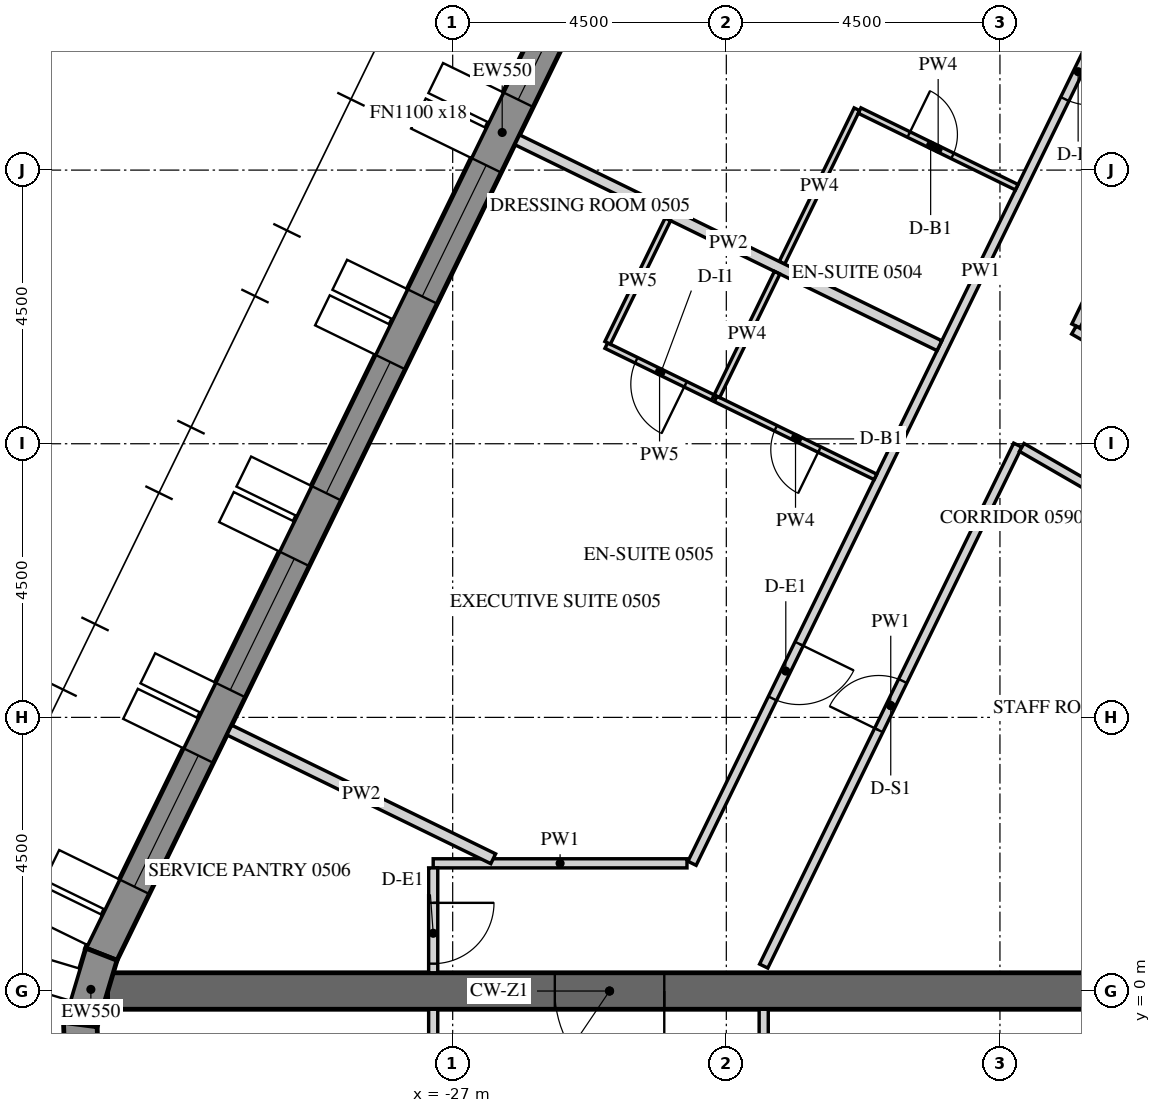
"""IFC4 building model, lengths in metres.
Left out: names, types, materials, properties, quantities, classifications, styles, units other than length and angle.
Written with IfcOpenShell. Run it as: python <this file> out.ifc"""

import sys

from ifc_helpers import new_model, si_unit, direction, frame, frame_2d, origin, place, context, subcontext, project, spatial, polyline, rectangle, outline, extrude, element, fill, save


model = new_model("IFC4")
c1 = context("Model", 3, precision=1e-05, world=origin(), true_north=direction((0.0, 1.0)))
c2 = subcontext(c1, "Body", "Model", "MODEL_VIEW")
j1 = project(units=[si_unit("LENGTHUNIT", "METRE"), si_unit("PLANEANGLEUNIT", "RADIAN")], contexts=[c1])
p1 = place(None, origin())
s1 = spatial("IfcSite", under=j1, at=p1, CompositionType="ELEMENT")
p2 = place(p1, origin())
s2 = spatial("IfcBuilding", under=s1, at=p2, CompositionType="ELEMENT")
p3 = place(p2, frame((0.0, 0.0, 80.4)))
s3 = spatial("IfcBuildingStorey", under=s2, at=p3, CompositionType="ELEMENT", Elevation=80.4)
p4 = place(p3, frame((-19.595, 27.633, -0.15), z_axis=(0.0, 0.0, 1.0), x_axis=(-0.438368285794, -0.898795441694, 0.0)))
e1 = element("IfcWall", 1, at=p4, inside=s3, PredefinedType="SOLIDWALL", context=c2, shape_type="SweptSolid", body=[
    extrude(outline(polyline([(-0.026, -0.275), (30.093, -0.275), (30.048, 0.275), (0.026, 0.275), (-0.026, -0.275)])), origin(), (0.0, 0.0, 1.0), 3.9),
])
p5 = place(p4, frame((1.236, 0.0, 1.05)))
e2 = element("IfcOpeningElement", 2, at=p5, cuts=e1, PredefinedType="OPENING", context=c2, shape_type="SweptSolid", body=[
    extrude(rectangle(XDim=2.4, YDim=2.4, at=frame_2d((1.2, 1.2))), frame((0.0, 0.285, 0.0), z_axis=(0.0, -1.0, 0.0), x_axis=(1.0, 0.0, 0.0)), (0.0, 0.0, 1.0), 0.57),
])
p6 = place(p4, frame((4.835, 0.0, 1.05)))
e3 = element("IfcOpeningElement", 3, at=p6, cuts=e1, PredefinedType="OPENING", context=c2, shape_type="SweptSolid", body=[
    extrude(rectangle(XDim=2.4, YDim=2.4, at=frame_2d((1.2, 1.2))), frame((0.0, 0.285, 0.0), z_axis=(0.0, -1.0, 0.0), x_axis=(1.0, 0.0, 0.0)), (0.0, 0.0, 1.0), 0.57),
])
p7 = place(p4, frame((8.436, 0.0, 1.05)))
e4 = element("IfcOpeningElement", 4, at=p7, cuts=e1, PredefinedType="OPENING", context=c2, shape_type="SweptSolid", body=[
    extrude(rectangle(XDim=2.4, YDim=2.4, at=frame_2d((1.2, 1.2))), frame((0.0, 0.285, 0.0), z_axis=(0.0, -1.0, 0.0), x_axis=(1.0, 0.0, 0.0)), (0.0, 0.0, 1.0), 0.57),
])
p8 = place(p4, frame((12.035, 0.0, 1.05)))
e5 = element("IfcOpeningElement", 5, at=p8, cuts=e1, PredefinedType="OPENING", context=c2, shape_type="SweptSolid", body=[
    extrude(rectangle(XDim=2.4, YDim=2.4, at=frame_2d((1.2, 1.2))), frame((0.0, 0.285, 0.0), z_axis=(0.0, -1.0, 0.0), x_axis=(1.0, 0.0, 0.0)), (0.0, 0.0, 1.0), 0.57),
])
p9 = place(p4, frame((15.635, 0.0, 1.05)))
e6 = element("IfcOpeningElement", 6, at=p9, cuts=e1, PredefinedType="OPENING", context=c2, shape_type="SweptSolid", body=[
    extrude(rectangle(XDim=2.4, YDim=2.4, at=frame_2d((1.2, 1.2))), frame((0.0, 0.285, 0.0), z_axis=(0.0, -1.0, 0.0), x_axis=(1.0, 0.0, 0.0)), (0.0, 0.0, 1.0), 0.57),
])
p10 = place(p4, frame((19.236, 0.0, 1.05)))
e7 = element("IfcOpeningElement", 7, at=p10, cuts=e1, PredefinedType="OPENING", context=c2, shape_type="SweptSolid", body=[
    extrude(rectangle(XDim=2.4, YDim=2.4, at=frame_2d((1.2, 1.2))), frame((0.0, 0.285, 0.0), z_axis=(0.0, -1.0, 0.0), x_axis=(1.0, 0.0, 0.0)), (0.0, 0.0, 1.0), 0.57),
])
p11 = place(p4, frame((22.835, 0.0, 1.05)))
e8 = element("IfcOpeningElement", 8, at=p11, cuts=e1, PredefinedType="OPENING", context=c2, shape_type="SweptSolid", body=[
    extrude(rectangle(XDim=2.4, YDim=2.4, at=frame_2d((1.2, 1.2))), frame((0.0, 0.285, 0.0), z_axis=(0.0, -1.0, 0.0), x_axis=(1.0, 0.0, 0.0)), (0.0, 0.0, 1.0), 0.57),
])
p12 = place(p4, frame((26.436, 0.0, 1.05)))
e9 = element("IfcOpeningElement", 9, at=p12, cuts=e1, PredefinedType="OPENING", context=c2, shape_type="SweptSolid", body=[
    extrude(rectangle(XDim=2.4, YDim=2.4, at=frame_2d((1.2, 1.2))), frame((0.0, 0.285, 0.0), z_axis=(0.0, -1.0, 0.0), x_axis=(1.0, 0.0, 0.0)), (0.0, 0.0, 1.0), 0.57),
])
p13 = place(p3, frame((-32.777, 0.605, -0.15), z_axis=(0.0, 0.0, 1.0), x_axis=(-0.286921497463, -0.957954098219, 0.0)))
e10 = element("IfcWall", 10, at=p13, inside=s3, PredefinedType="SOLIDWALL", context=c2, shape_type="SweptSolid", body=[
    extrude(outline(polyline([(-0.022, -0.275), (1.253, -0.275), (1.163, 0.275), (0.022, 0.275), (-0.022, -0.275)])), origin(), (0.0, 0.0, 1.0), 3.9),
])
p14 = place(p3, frame((-33.124, -0.552, -0.15), z_axis=(0.0, 0.0, 1.0), x_axis=(0.03495638276, -0.999388838893, 0.0)))
e11 = element("IfcWall", 11, at=p14, inside=s3, PredefinedType="SOLIDWALL", context=c2, shape_type="SweptSolid", body=[
    extrude(outline(polyline([(-0.045, -0.275), (1.253, -0.275), (1.163, 0.275), (0.045, 0.275), (-0.045, -0.275)])), origin(), (0.0, 0.0, 1.0), 3.9),
])
p15 = place(p3, frame((-16.166, 0.0, -0.15), z_axis=(0.0, 0.0, 1.0), x_axis=(-1.0, 0.0, 0.0)))
e12 = element("IfcWall", 12, at=p15, inside=s3, PredefinedType="SHEAR", context=c2, shape_type="SweptSolid", body=[
    extrude(rectangle(XDim=16.509, YDim=0.6, at=frame_2d((8.254, 0.0))), origin(), (0.0, 0.0, 1.0), 3.9),
])
p16 = place(p15, frame((7.354, 0.0, 0.15)))
e13 = element("IfcOpeningElement", 13, at=p16, cuts=e12, PredefinedType="OPENING", context=c2, shape_type="SweptSolid", body=[
    extrude(rectangle(XDim=1.8, YDim=2.4, at=frame_2d((0.9, 1.2))), frame((0.0, 0.31, 0.0), z_axis=(0.0, -1.0, 0.0), x_axis=(1.0, 0.0, 0.0)), (0.0, 0.0, 1.0), 0.62),
])
p17 = place(p3, frame((-13.565, 21.575, 0.0), z_axis=(0.0, 0.0, 1.0), x_axis=(-0.438380787243, -0.898789344272, 0.0)))
e14 = element("IfcWall", 14, at=p17, inside=s3, PredefinedType="PARTITIONING", context=c2, shape_type="SweptSolid", body=[
    extrude(rectangle(XDim=21.668, YDim=0.15, at=frame_2d((10.834, 0.0))), origin(), (0.0, 0.0, 1.0), 2.988),
])
p18 = place(p17, frame((6.684, 0.0, 0.0)))
e15 = element("IfcOpeningElement", 15, at=p18, cuts=e14, PredefinedType="OPENING", context=c2, shape_type="SweptSolid", body=[
    extrude(rectangle(XDim=1.0, YDim=2.1, at=frame_2d((0.5, 1.05))), frame((0.0, 0.085, 0.0), z_axis=(0.0, -1.0, 0.0), x_axis=(1.0, 0.0, 0.0)), (0.0, 0.0, 1.0), 0.17),
])
p19 = place(p17, frame((17.651, 0.0, 0.0)))
e16 = element("IfcOpeningElement", 16, at=p19, cuts=e14, PredefinedType="OPENING", context=c2, shape_type="SweptSolid", body=[
    extrude(rectangle(XDim=1.0, YDim=2.1, at=frame_2d((0.5, 1.05))), frame((0.0, 0.085, 0.0), z_axis=(0.0, -1.0, 0.0), x_axis=(1.0, 0.0, 0.0)), (0.0, 0.0, 1.0), 0.17),
])
p20 = place(p3, frame((-23.147, 2.1, 0.0), z_axis=(0.0, 0.0, 1.0), x_axis=(-1.0, 0.0, 0.0)))
e17 = element("IfcWall", 17, at=p20, inside=s3, PredefinedType="PARTITIONING", context=c2, shape_type="SweptSolid", body=[
    extrude(rectangle(XDim=4.173, YDim=0.15, at=frame_2d((2.087, 0.0))), origin(), (0.0, 0.0, 1.0), 2.988),
])
p21 = place(p3, frame((-27.32, 2.025, 0.0), z_axis=(0.0, 0.0, 1.0), x_axis=(0.0, -1.0, 0.0)))
e18 = element("IfcWall", 18, at=p21, inside=s3, PredefinedType="PARTITIONING", context=c2, shape_type="SweptSolid", body=[
    extrude(rectangle(XDim=1.725, YDim=0.15, at=frame_2d((0.862, 0.0))), origin(), (0.0, 0.0, 1.0), 2.988),
])
p22 = place(p21, frame((0.575, 0.0, 0.0)))
e19 = element("IfcOpeningElement", 19, at=p22, cuts=e18, PredefinedType="OPENING", context=c2, shape_type="SweptSolid", body=[
    extrude(rectangle(XDim=1.0, YDim=2.1, at=frame_2d((0.5, 1.05))), frame((0.0, 0.085, 0.0), z_axis=(0.0, -1.0, 0.0), x_axis=(1.0, 0.0, 0.0)), (0.0, 0.0, 1.0), 0.17),
])
p23 = place(p3, frame((-16.751, 10.937, 0.0), z_axis=(0.0, 0.0, 1.0), x_axis=(0.438378523504, 0.898790448397, 0.0)))
e20 = element("IfcWall", 20, at=p23, inside=s3, PredefinedType="PARTITIONING", context=c2, shape_type="SweptSolid", body=[
    extrude(rectangle(XDim=9.917, YDim=0.15, at=frame_2d((4.958, 0.0))), origin(), (0.0, 0.0, 1.0), 2.988),
])
p24 = place(p3, frame((-11.614, 7.884, 0.0), z_axis=(0.0, 0.0, 1.0), x_axis=(-0.86603508376, 0.499983233416, 0.0)))
e21 = element("IfcWall", 21, at=p24, inside=s3, PredefinedType="PARTITIONING", context=c2, shape_type="SweptSolid", body=[
    extrude(rectangle(XDim=5.97, YDim=0.15, at=frame_2d((2.985, 0.0))), origin(), (0.0, 0.0, 1.0), 2.988),
])
p25 = place(p24, frame((2.535, 0.0, 0.0)))
e22 = element("IfcOpeningElement", 22, at=p25, cuts=e21, PredefinedType="OPENING", context=c2, shape_type="SweptSolid", body=[
    extrude(rectangle(XDim=0.9, YDim=2.1, at=frame_2d((0.45, 1.05))), frame((0.0, 0.085, 0.0), z_axis=(0.0, -1.0, 0.0), x_axis=(1.0, 0.0, 0.0)), (0.0, 0.0, 1.0), 0.17),
])
p26 = place(p3, frame((-21.885, 0.41, 0.0), z_axis=(0.0, 0.0, 1.0), x_axis=(0.43837064471, 0.898794291179, 0.0)))
e23 = element("IfcWall", 23, at=p26, inside=s3, PredefinedType="PARTITIONING", context=c2, shape_type="SweptSolid", body=[
    extrude(rectangle(XDim=9.532, YDim=0.15, at=frame_2d((4.766, 0.0))), origin(), (0.0, 0.0, 1.0), 2.988),
])
p27 = place(p26, frame((4.316, 0.0, 0.0)))
e24 = element("IfcOpeningElement", 24, at=p27, cuts=e23, PredefinedType="OPENING", context=c2, shape_type="SweptSolid", body=[
    extrude(rectangle(XDim=0.9, YDim=2.1, at=frame_2d((0.45, 1.05))), frame((0.0, 0.085, 0.0), z_axis=(0.0, -1.0, 0.0), x_axis=(1.0, 0.0, 0.0)), (0.0, 0.0, 1.0), 0.17),
])
p28 = place(p3, frame((-17.642, 8.94, 0.0), z_axis=(0.0, 0.0, 1.0), x_axis=(0.866017948234, -0.500012913169, 0.0)))
e25 = element("IfcWall", 25, at=p28, inside=s3, PredefinedType="PARTITIONING", context=c2, shape_type="SweptSolid", body=[
    extrude(rectangle(XDim=5.748, YDim=0.15, at=frame_2d((2.874, 0.0))), origin(), (0.0, 0.0, 1.0), 2.988),
])
p29 = place(p3, frame((-27.32, -0.3, 0.0), z_axis=(0.0, 0.0, 1.0), x_axis=(0.0, -1.0, 0.0)))
e26 = element("IfcWall", 26, at=p29, inside=s3, PredefinedType="PARTITIONING", context=c2, shape_type="SweptSolid", body=[
    extrude(rectangle(XDim=1.8, YDim=0.15, at=frame_2d((0.9, 0.0))), origin(), (0.0, 0.0, 1.0), 2.988),
])
p30 = place(p3, frame((-21.885, -1.644, 0.0), z_axis=(0.0, 0.0, 1.0), x_axis=(0.0, 1.0, 0.0)))
e27 = element("IfcWall", 27, at=p30, inside=s3, PredefinedType="PARTITIONING", context=c2, shape_type="SweptSolid", body=[
    extrude(rectangle(XDim=1.344, YDim=0.15, at=frame_2d((0.672, 0.0))), origin(), (0.0, 0.0, 1.0), 2.988),
])
p31 = place(p3, frame((-21.585, 11.975, 0.0), z_axis=(0.0, 0.0, 1.0), x_axis=(0.438399667674, 0.898780135174, 0.0)))
e28 = element("IfcWall", 28, at=p31, inside=s3, PredefinedType="PARTITIONING", context=c2, shape_type="SweptSolid", body=[
    extrude(rectangle(XDim=2.81, YDim=0.1, at=frame_2d((1.405, 0.0))), origin(), (0.0, 0.0, 1.0), 2.988),
])
p32 = place(p3, frame((-20.308, 14.479, 0.0), z_axis=(0.0, 0.0, 1.0), x_axis=(0.898799457159, -0.438360052708, 0.0)))
e29 = element("IfcWall", 29, at=p32, inside=s3, PredefinedType="PARTITIONING", context=c2, shape_type="SweptSolid", body=[
    extrude(rectangle(XDim=2.875, YDim=0.1, at=frame_2d((1.438, 0.0))), origin(), (0.0, 0.0, 1.0), 2.988),
])
p33 = place(p32, frame((0.9, 0.0, 0.0)))
e30 = element("IfcOpeningElement", 30, at=p33, cuts=e29, PredefinedType="OPENING", context=c2, shape_type="SweptSolid", body=[
    extrude(rectangle(XDim=0.8, YDim=2.1, at=frame_2d((0.4, 1.05))), frame((0.0, 0.06, 0.0), z_axis=(0.0, -1.0, 0.0), x_axis=(1.0, 0.0, 0.0)), (0.0, 0.0, 1.0), 0.12),
])
p34 = place(p3, frame((-25.938, 13.999, 0.0), z_axis=(0.0, 0.0, 1.0), x_axis=(0.898789402655, -0.438380667542, 0.0)))
e31 = element("IfcWall", 31, at=p34, inside=s3, PredefinedType="PARTITIONING", context=c2, shape_type="SweptSolid", body=[
    extrude(rectangle(XDim=7.725, YDim=0.18, at=frame_2d((3.862, 0.0))), origin(), (0.0, 0.0, 1.0), 2.988),
])
p35 = place(p3, frame((-20.047, 8.455, 0.0), z_axis=(0.0, 0.0, 1.0), x_axis=(-0.89880694479, 0.438344699976, 0.0)))
e32 = element("IfcWall", 32, at=p35, inside=s3, PredefinedType="PARTITIONING", context=c2, shape_type="SweptSolid", body=[
    extrude(rectangle(XDim=2.925, YDim=0.1, at=frame_2d((1.462, 0.0))), origin(), (0.0, 0.0, 1.0), 2.988),
])
p36 = place(p35, frame((1.025, 0.0, 0.0)))
e33 = element("IfcOpeningElement", 33, at=p36, cuts=e32, PredefinedType="OPENING", context=c2, shape_type="SweptSolid", body=[
    extrude(rectangle(XDim=0.8, YDim=2.1, at=frame_2d((0.4, 1.05))), frame((0.0, 0.06, 0.0), z_axis=(0.0, -1.0, 0.0), x_axis=(1.0, 0.0, 0.0)), (0.0, 0.0, 1.0), 0.12),
])
p37 = place(p3, frame((-22.721, 9.759, 0.0), z_axis=(0.0, 0.0, 1.0), x_axis=(-0.898815368173, 0.438327427772, 0.0)))
e34 = element("IfcWall", 34, at=p37, inside=s3, PredefinedType="PARTITIONING", context=c2, shape_type="SweptSolid", body=[
    extrude(rectangle(XDim=1.95, YDim=0.1, at=frame_2d((0.975, 0.0))), origin(), (0.0, 0.0, 1.0), 2.988),
])
p38 = place(p37, frame((0.5, 0.0, 0.0)))
e35 = element("IfcOpeningElement", 35, at=p38, cuts=e34, PredefinedType="OPENING", context=c2, shape_type="SweptSolid", body=[
    extrude(rectangle(XDim=0.9, YDim=2.1, at=frame_2d((0.45, 1.05))), frame((0.0, 0.06, 0.0), z_axis=(0.0, -1.0, 0.0), x_axis=(1.0, 0.0, 0.0)), (0.0, 0.0, 1.0), 0.12),
])
p39 = place(p3, frame((-24.452, 10.659, 0.0), z_axis=(0.0, 0.0, 1.0), x_axis=(0.438376807268, 0.898791285477, 0.0)))
e36 = element("IfcWall", 36, at=p39, inside=s3, PredefinedType="PARTITIONING", context=c2, shape_type="SweptSolid", body=[
    extrude(rectangle(XDim=2.26, YDim=0.1, at=frame_2d((1.13, 0.0))), origin(), (0.0, 0.0, 1.0), 2.988),
])
p40 = place(p3, frame((-30.673, 4.292, 0.0), z_axis=(0.0, 0.0, 1.0), x_axis=(0.898812662672, -0.438332975512, 0.0)))
e37 = element("IfcWall", 37, at=p40, inside=s3, PredefinedType="PARTITIONING", context=c2, shape_type="SweptSolid", body=[
    extrude(rectangle(XDim=4.828, YDim=0.18, at=frame_2d((2.414, 0.0))), origin(), (0.0, 0.0, 1.0), 2.988),
])
p41 = place(p3, frame((-21.664, 11.813, 0.0), z_axis=(0.0, 0.0, 1.0), x_axis=(-0.438376807268, -0.898791285477, 0.0)))
e38 = element("IfcWall", 38, at=p41, inside=s3, PredefinedType="PARTITIONING", context=c2, shape_type="SweptSolid", body=[
    extrude(rectangle(XDim=2.26, YDim=0.1, at=frame_2d((1.13, 0.0))), origin(), (0.0, 0.0, 1.0), 2.988),
])
p42 = place(p8, frame((0.0, 0.205, 0.0)))
e39 = element("IfcWindow", 39, at=p42, inside=s3, PartitioningType="DOUBLE_PANEL_VERTICAL", PredefinedType="WINDOW", context=c2, shape_type="SweptSolid", body=[
    extrude(rectangle(XDim=2.4, YDim=2.4, at=frame_2d((1.2, 1.2))), frame((0.0, 0.03, 0.0), z_axis=(0.0, -1.0, 0.0), x_axis=(1.0, 0.0, 0.0)), (0.0, 0.0, 1.0), 0.06),
])
fill(e5, e39)
p43 = place(p9, frame((0.0, 0.205, 0.0)))
e40 = element("IfcWindow", 40, at=p43, inside=s3, PartitioningType="DOUBLE_PANEL_VERTICAL", PredefinedType="WINDOW", context=c2, shape_type="SweptSolid", body=[
    extrude(rectangle(XDim=2.4, YDim=2.4, at=frame_2d((1.2, 1.2))), frame((0.0, 0.03, 0.0), z_axis=(0.0, -1.0, 0.0), x_axis=(1.0, 0.0, 0.0)), (0.0, 0.0, 1.0), 0.06),
])
fill(e6, e40)
p44 = place(p10, frame((0.0, 0.205, 0.0)))
e41 = element("IfcWindow", 41, at=p44, inside=s3, PartitioningType="DOUBLE_PANEL_VERTICAL", PredefinedType="WINDOW", context=c2, shape_type="SweptSolid", body=[
    extrude(rectangle(XDim=2.4, YDim=2.4, at=frame_2d((1.2, 1.2))), frame((0.0, 0.03, 0.0), z_axis=(0.0, -1.0, 0.0), x_axis=(1.0, 0.0, 0.0)), (0.0, 0.0, 1.0), 0.06),
])
fill(e7, e41)
p45 = place(p11, frame((0.0, 0.205, 0.0)))
e42 = element("IfcWindow", 42, at=p45, inside=s3, PartitioningType="DOUBLE_PANEL_VERTICAL", PredefinedType="WINDOW", context=c2, shape_type="SweptSolid", body=[
    extrude(rectangle(XDim=2.4, YDim=2.4, at=frame_2d((1.2, 1.2))), frame((0.0, 0.03, 0.0), z_axis=(0.0, -1.0, 0.0), x_axis=(1.0, 0.0, 0.0)), (0.0, 0.0, 1.0), 0.06),
])
fill(e8, e42)
p46 = place(p12, frame((0.0, 0.205, 0.0)))
e43 = element("IfcWindow", 43, at=p46, inside=s3, PartitioningType="DOUBLE_PANEL_VERTICAL", PredefinedType="WINDOW", context=c2, shape_type="SweptSolid", body=[
    extrude(rectangle(XDim=2.4, YDim=2.4, at=frame_2d((1.2, 1.2))), frame((0.0, 0.03, 0.0), z_axis=(0.0, -1.0, 0.0), x_axis=(1.0, 0.0, 0.0)), (0.0, 0.0, 1.0), 0.06),
])
fill(e9, e43)
p47 = place(p16, origin())
e44 = element("IfcDoor", 44, at=p47, inside=s3, OperationType="DOUBLE_DOOR_SINGLE_SWING", PredefinedType="DOOR", context=c2, shape_type="SweptSolid", body=[
    extrude(rectangle(XDim=1.8, YDim=2.4, at=frame_2d((0.9, 1.2))), frame((0.0, 0.025, 0.0), z_axis=(0.0, -1.0, 0.0), x_axis=(1.0, 0.0, 0.0)), (0.0, 0.0, 1.0), 0.05),
])
fill(e13, e44)
p48 = place(p18, origin())
e45 = element("IfcDoor", 45, at=p48, inside=s3, OperationType="SINGLE_SWING_LEFT", PredefinedType="DOOR", context=c2, shape_type="SweptSolid", body=[
    extrude(rectangle(XDim=1.0, YDim=2.1, at=frame_2d((0.5, 1.05))), frame((0.0, 0.025, 0.0), z_axis=(0.0, -1.0, 0.0), x_axis=(1.0, 0.0, 0.0)), (0.0, 0.0, 1.0), 0.05),
])
fill(e15, e45)
p49 = place(p33, origin())
e46 = element("IfcDoor", 46, at=p49, inside=s3, OperationType="SINGLE_SWING_RIGHT", PredefinedType="DOOR", context=c2, shape_type="SweptSolid", body=[
    extrude(rectangle(XDim=0.8, YDim=2.1, at=frame_2d((0.4, 1.05))), frame((0.0, 0.025, 0.0), z_axis=(0.0, -1.0, 0.0), x_axis=(1.0, 0.0, 0.0)), (0.0, 0.0, 1.0), 0.05),
])
fill(e30, e46)
p50 = place(p19, origin())
e47 = element("IfcDoor", 47, at=p50, inside=s3, OperationType="SINGLE_SWING_LEFT", PredefinedType="DOOR", context=c2, shape_type="SweptSolid", body=[
    extrude(rectangle(XDim=1.0, YDim=2.1, at=frame_2d((0.5, 1.05))), frame((0.0, 0.025, 0.0), z_axis=(0.0, -1.0, 0.0), x_axis=(1.0, 0.0, 0.0)), (0.0, 0.0, 1.0), 0.05),
])
fill(e16, e47)
p51 = place(p36, origin())
e48 = element("IfcDoor", 48, at=p51, inside=s3, OperationType="SINGLE_SWING_RIGHT", PredefinedType="DOOR", context=c2, shape_type="SweptSolid", body=[
    extrude(rectangle(XDim=0.8, YDim=2.1, at=frame_2d((0.4, 1.05))), frame((0.0, 0.025, 0.0), z_axis=(0.0, -1.0, 0.0), x_axis=(1.0, 0.0, 0.0)), (0.0, 0.0, 1.0), 0.05),
])
fill(e33, e48)
p52 = place(p38, origin())
e49 = element("IfcDoor", 49, at=p52, inside=s3, OperationType="SINGLE_SWING_RIGHT", PredefinedType="DOOR", context=c2, shape_type="SweptSolid", body=[
    extrude(rectangle(XDim=0.9, YDim=2.1, at=frame_2d((0.45, 1.05))), frame((0.0, 0.025, 0.0), z_axis=(0.0, -1.0, 0.0), x_axis=(1.0, 0.0, 0.0)), (0.0, 0.0, 1.0), 0.05),
])
fill(e35, e49)
p53 = place(p22, origin())
e50 = element("IfcDoor", 50, at=p53, inside=s3, OperationType="SINGLE_SWING_LEFT", PredefinedType="DOOR", context=c2, shape_type="SweptSolid", body=[
    extrude(rectangle(XDim=1.0, YDim=2.1, at=frame_2d((0.5, 1.05))), frame((0.0, 0.025, 0.0), z_axis=(0.0, -1.0, 0.0), x_axis=(1.0, 0.0, 0.0)), (0.0, 0.0, 1.0), 0.05),
])
fill(e19, e50)
p54 = place(p27, origin())
e51 = element("IfcDoor", 51, at=p54, inside=s3, OperationType="SINGLE_SWING_RIGHT", PredefinedType="DOOR", context=c2, shape_type="SweptSolid", body=[
    extrude(rectangle(XDim=0.9, YDim=2.1, at=frame_2d((0.45, 1.05))), frame((0.0, 0.025, 0.0), z_axis=(0.0, -1.0, 0.0), x_axis=(1.0, 0.0, 0.0)), (0.0, 0.0, 1.0), 0.05),
])
fill(e24, e51)
save(model, sys.argv[1])
